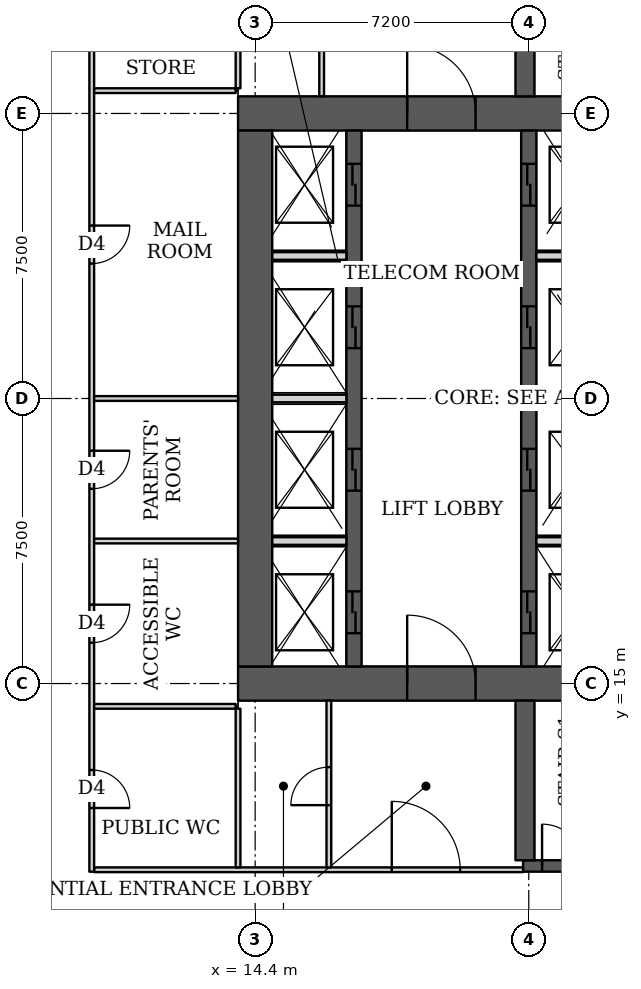
"""IFC4 building model, lengths in metres.
Left out: names, types, materials, properties, quantities, classifications, styles, units other than length and angle.
Written with IfcOpenShell. Run it as: python <this file> out.ifc"""

import sys

from ifc_helpers import new_model, si_unit, direction, frame, frame_2d, origin, place, context, subcontext, project, spatial, rectangle, extrude, element, fill, save


model = new_model("IFC4")
c1 = context("Model", 3, precision=1e-05, world=origin(), true_north=direction((0.0, 1.0)))
c2 = subcontext(c1, "Body", "Model", "MODEL_VIEW")
j1 = project(units=[si_unit("LENGTHUNIT", "METRE"), si_unit("PLANEANGLEUNIT", "RADIAN")], contexts=[c1])
p1 = place(None, origin())
s1 = spatial("IfcSite", under=j1, at=p1, CompositionType="ELEMENT")
p2 = place(p1, origin())
s2 = spatial("IfcBuilding", under=s1, at=p2, CompositionType="ELEMENT")
p3 = place(p2, origin())
s3 = spatial("IfcBuildingStorey", under=s2, at=p3, CompositionType="ELEMENT", Elevation=0.0)
p4 = place(p3, frame((13.95, 15.0, 0.0), z_axis=(0.0, 0.0, 1.0), x_axis=(1.0, 0.0, 0.0)))
e1 = element("IfcWall", 1, at=p4, inside=s3, PredefinedType="SHEAR", context=c2, shape_type="SweptSolid", body=[
    extrude(rectangle(XDim=15.3, YDim=0.9, at=frame_2d((7.65, 0.0))), origin(), (0.0, 0.0, 1.0), 5.6),
])
p5 = place(p4, frame((4.45, 0.0, 0.0)))
e2 = element("IfcOpeningElement", 2, at=p5, cuts=e1, PredefinedType="OPENING", context=c2, shape_type="SweptSolid", body=[
    extrude(rectangle(XDim=1.8, YDim=2.1, at=frame_2d((0.9, 1.05))), frame((0.0, 0.46, 0.0), z_axis=(0.0, -1.0, 0.0), x_axis=(1.0, 0.0, 0.0)), (0.0, 0.0, 1.0), 0.92),
])
p6 = place(p4, frame((10.7, 0.0, 0.0)))
e3 = element("IfcOpeningElement", 3, at=p6, cuts=e1, PredefinedType="OPENING", context=c2, shape_type="SweptSolid", body=[
    extrude(rectangle(XDim=1.1, YDim=2.1, at=frame_2d((0.55, 1.05))), frame((0.0, 0.46, 0.0), z_axis=(0.0, -1.0, 0.0), x_axis=(1.0, 0.0, 0.0)), (0.0, 0.0, 1.0), 0.92),
])
p7 = place(p3, frame((13.95, 30.0, 0.0), z_axis=(0.0, 0.0, 1.0), x_axis=(1.0, 0.0, 0.0)))
e4 = element("IfcWall", 4, at=p7, inside=s3, PredefinedType="SHEAR", context=c2, shape_type="SweptSolid", body=[
    extrude(rectangle(XDim=15.3, YDim=0.9, at=frame_2d((7.65, 0.0))), origin(), (0.0, 0.0, 1.0), 5.6),
])
p8 = place(p7, frame((4.45, 0.0, 0.0)))
e5 = element("IfcOpeningElement", 5, at=p8, cuts=e4, PredefinedType="OPENING", context=c2, shape_type="SweptSolid", body=[
    extrude(rectangle(XDim=1.8, YDim=2.1, at=frame_2d((0.9, 1.05))), frame((0.0, 0.46, 0.0), z_axis=(0.0, -1.0, 0.0), x_axis=(1.0, 0.0, 0.0)), (0.0, 0.0, 1.0), 0.92),
])
p9 = place(p7, frame((10.7, 0.0, 0.0)))
e6 = element("IfcOpeningElement", 6, at=p9, cuts=e4, PredefinedType="OPENING", context=c2, shape_type="SweptSolid", body=[
    extrude(rectangle(XDim=1.1, YDim=2.1, at=frame_2d((0.55, 1.05))), frame((0.0, 0.46, 0.0), z_axis=(0.0, -1.0, 0.0), x_axis=(1.0, 0.0, 0.0)), (0.0, 0.0, 1.0), 0.92),
])
p10 = place(p3, frame((14.4, 15.45, 0.0), z_axis=(0.0, 0.0, 1.0), x_axis=(0.0, 1.0, 0.0)))
e7 = element("IfcWall", 7, at=p10, inside=s3, PredefinedType="SHEAR", context=c2, shape_type="SweptSolid", body=[
    extrude(rectangle(XDim=14.1, YDim=0.9, at=frame_2d((7.05, 0.0))), origin(), (0.0, 0.0, 1.0), 5.6),
])
p11 = place(p3, frame((17.0, 15.45, 0.0), z_axis=(0.0, 0.0, 1.0), x_axis=(0.0, 1.0, 0.0)))
e8 = element("IfcWall", 8, at=p11, inside=s3, PredefinedType="SHEAR", context=c2, shape_type="SweptSolid", body=[
    extrude(rectangle(XDim=14.1, YDim=0.4, at=frame_2d((7.05, 0.0))), origin(), (0.0, 0.0, 1.0), 5.6),
])
p12 = place(p11, frame((0.875, 0.0, 0.0)))
e9 = element("IfcOpeningElement", 9, at=p12, cuts=e8, PredefinedType="OPENING", context=c2, shape_type="SweptSolid", body=[
    extrude(rectangle(XDim=1.1, YDim=2.1, at=frame_2d((0.55, 1.05))), frame((0.0, 0.21, 0.0), z_axis=(0.0, -1.0, 0.0), x_axis=(1.0, 0.0, 0.0)), (0.0, 0.0, 1.0), 0.42),
])
p13 = place(p11, frame((4.625, 0.0, 0.0)))
e10 = element("IfcOpeningElement", 10, at=p13, cuts=e8, PredefinedType="OPENING", context=c2, shape_type="SweptSolid", body=[
    extrude(rectangle(XDim=1.1, YDim=2.1, at=frame_2d((0.55, 1.05))), frame((0.0, 0.21, 0.0), z_axis=(0.0, -1.0, 0.0), x_axis=(1.0, 0.0, 0.0)), (0.0, 0.0, 1.0), 0.42),
])
p14 = place(p11, frame((8.375, 0.0, 0.0)))
e11 = element("IfcOpeningElement", 11, at=p14, cuts=e8, PredefinedType="OPENING", context=c2, shape_type="SweptSolid", body=[
    extrude(rectangle(XDim=1.1, YDim=2.1, at=frame_2d((0.55, 1.05))), frame((0.0, 0.21, 0.0), z_axis=(0.0, -1.0, 0.0), x_axis=(1.0, 0.0, 0.0)), (0.0, 0.0, 1.0), 0.42),
])
p15 = place(p11, frame((12.125, 0.0, 0.0)))
e12 = element("IfcOpeningElement", 12, at=p15, cuts=e8, PredefinedType="OPENING", context=c2, shape_type="SweptSolid", body=[
    extrude(rectangle(XDim=1.1, YDim=2.1, at=frame_2d((0.55, 1.05))), frame((0.0, 0.21, 0.0), z_axis=(0.0, -1.0, 0.0), x_axis=(1.0, 0.0, 0.0)), (0.0, 0.0, 1.0), 0.42),
])
p16 = place(p3, frame((21.6, 15.45, 0.0), z_axis=(0.0, 0.0, 1.0), x_axis=(0.0, 1.0, 0.0)))
e13 = element("IfcWall", 13, at=p16, inside=s3, PredefinedType="SHEAR", context=c2, shape_type="SweptSolid", body=[
    extrude(rectangle(XDim=14.1, YDim=0.4, at=frame_2d((7.05, 0.0))), origin(), (0.0, 0.0, 1.0), 5.6),
])
p17 = place(p16, frame((0.875, 0.0, 0.0)))
e14 = element("IfcOpeningElement", 14, at=p17, cuts=e13, PredefinedType="OPENING", context=c2, shape_type="SweptSolid", body=[
    extrude(rectangle(XDim=1.1, YDim=2.1, at=frame_2d((0.55, 1.05))), frame((0.0, 0.21, 0.0), z_axis=(0.0, -1.0, 0.0), x_axis=(1.0, 0.0, 0.0)), (0.0, 0.0, 1.0), 0.42),
])
p18 = place(p16, frame((4.625, 0.0, 0.0)))
e15 = element("IfcOpeningElement", 15, at=p18, cuts=e13, PredefinedType="OPENING", context=c2, shape_type="SweptSolid", body=[
    extrude(rectangle(XDim=1.1, YDim=2.1, at=frame_2d((0.55, 1.05))), frame((0.0, 0.21, 0.0), z_axis=(0.0, -1.0, 0.0), x_axis=(1.0, 0.0, 0.0)), (0.0, 0.0, 1.0), 0.42),
])
p19 = place(p16, frame((8.375, 0.0, 0.0)))
e16 = element("IfcOpeningElement", 16, at=p19, cuts=e13, PredefinedType="OPENING", context=c2, shape_type="SweptSolid", body=[
    extrude(rectangle(XDim=1.1, YDim=2.1, at=frame_2d((0.55, 1.05))), frame((0.0, 0.21, 0.0), z_axis=(0.0, -1.0, 0.0), x_axis=(1.0, 0.0, 0.0)), (0.0, 0.0, 1.0), 0.42),
])
p20 = place(p16, frame((12.125, 0.0, 0.0)))
e17 = element("IfcOpeningElement", 17, at=p20, cuts=e13, PredefinedType="OPENING", context=c2, shape_type="SweptSolid", body=[
    extrude(rectangle(XDim=1.1, YDim=2.1, at=frame_2d((0.55, 1.05))), frame((0.0, 0.21, 0.0), z_axis=(0.0, -1.0, 0.0), x_axis=(1.0, 0.0, 0.0)), (0.0, 0.0, 1.0), 0.42),
])
p21 = place(p3, frame((21.45, 10.2, 0.0), z_axis=(0.0, 0.0, 1.0), x_axis=(1.0, 0.0, 0.0)))
e18 = element("IfcWall", 18, at=p21, inside=s3, PredefinedType="SHEAR", context=c2, shape_type="SweptSolid", body=[
    extrude(rectangle(XDim=7.5, YDim=0.3, at=frame_2d((3.75, 0.0))), origin(), (0.0, 0.0, 1.0), 5.6),
])
p22 = place(p21, frame((0.5, 0.0, 0.0)))
e19 = element("IfcOpeningElement", 19, at=p22, cuts=e18, PredefinedType="OPENING", context=c2, shape_type="SweptSolid", body=[
    extrude(rectangle(XDim=1.1, YDim=2.1, at=frame_2d((0.55, 1.05))), frame((0.0, 0.16, 0.0), z_axis=(0.0, -1.0, 0.0), x_axis=(1.0, 0.0, 0.0)), (0.0, 0.0, 1.0), 0.32),
])
for number, where, z_axis, x_axis in (
    (20, (21.5, 10.35, 0.0), (0.0, 0.0, 1.0), (0.0, 1.0, 0.0)),
    (21, (21.5, 30.45, 0.0), (0.0, 0.0, 1.0), (0.0, 1.0, 0.0)),
):
    element("IfcWall", number, at=place(p3, frame(where, z_axis=z_axis, x_axis=x_axis)), inside=s3, PredefinedType="SHEAR", context=c2, shape_type="SweptSolid", body=[
        extrude(rectangle(XDim=4.2, YDim=0.5, at=frame_2d((2.1, 0.0))), origin(), (0.0, 0.0, 1.0), 5.6),
    ])
p23 = place(p3, frame((10.1, 10.05, 0.0), z_axis=(0.0, 0.0, 1.0), x_axis=(0.0, 1.0, 0.0)))
e22 = element("IfcWall", 22, at=p23, inside=s3, PredefinedType="PARTITIONING", context=c2, shape_type="SweptSolid", body=[
    extrude(rectangle(XDim=24.9, YDim=0.125, at=frame_2d((12.45, 0.0))), origin(), (0.0, 0.0, 1.0), 3.7),
])
p24 = place(p23, frame((1.675, 0.0, 0.0)))
e23 = element("IfcOpeningElement", 23, at=p24, cuts=e22, PredefinedType="OPENING", context=c2, shape_type="SweptSolid", body=[
    extrude(rectangle(XDim=1.0, YDim=2.1, at=frame_2d((0.5, 1.05))), frame((0.0, 0.073, 0.0), z_axis=(0.0, -1.0, 0.0), x_axis=(1.0, 0.0, 0.0)), (0.0, 0.0, 1.0), 0.145),
])
p25 = place(p23, frame((16.0, 0.0, 0.0)))
e24 = element("IfcOpeningElement", 24, at=p25, cuts=e22, PredefinedType="OPENING", context=c2, shape_type="SweptSolid", body=[
    extrude(rectangle(XDim=1.0, YDim=2.1, at=frame_2d((0.5, 1.05))), frame((0.0, 0.073, 0.0), z_axis=(0.0, -1.0, 0.0), x_axis=(1.0, 0.0, 0.0)), (0.0, 0.0, 1.0), 0.145),
])
p26 = place(p23, frame((22.225, 0.0, 0.0)))
e25 = element("IfcOpeningElement", 25, at=p26, cuts=e22, PredefinedType="OPENING", context=c2, shape_type="SweptSolid", body=[
    extrude(rectangle(XDim=1.0, YDim=2.1, at=frame_2d((0.5, 1.05))), frame((0.0, 0.073, 0.0), z_axis=(0.0, -1.0, 0.0), x_axis=(1.0, 0.0, 0.0)), (0.0, 0.0, 1.0), 0.145),
])
p27 = place(p23, frame((6.025, 0.0, 0.0)))
e26 = element("IfcOpeningElement", 26, at=p27, cuts=e22, PredefinedType="OPENING", context=c2, shape_type="SweptSolid", body=[
    extrude(rectangle(XDim=1.0, YDim=2.1, at=frame_2d((0.5, 1.05))), frame((0.0, 0.073, 0.0), z_axis=(0.0, -1.0, 0.0), x_axis=(1.0, 0.0, 0.0)), (0.0, 0.0, 1.0), 0.145),
])
p28 = place(p23, frame((10.075, 0.0, 0.0)))
e27 = element("IfcOpeningElement", 27, at=p28, cuts=e22, PredefinedType="OPENING", context=c2, shape_type="SweptSolid", body=[
    extrude(rectangle(XDim=1.0, YDim=2.1, at=frame_2d((0.5, 1.05))), frame((0.0, 0.073, 0.0), z_axis=(0.0, -1.0, 0.0), x_axis=(1.0, 0.0, 0.0)), (0.0, 0.0, 1.0), 0.145),
])
p29 = place(p3, frame((10.163, 14.4, 0.0), z_axis=(0.0, 0.0, 1.0), x_axis=(1.0, 0.0, 0.0)))
e28 = element("IfcWall", 28, at=p29, inside=s3, PredefinedType="PARTITIONING", context=c2, shape_type="SweptSolid", body=[
    extrude(rectangle(XDim=3.725, YDim=0.125, at=frame_2d((1.862, 0.0))), origin(), (0.0, 0.0, 1.0), 3.7),
])
p30 = place(p3, frame((10.163, 22.5, 0.0), z_axis=(0.0, 0.0, 1.0), x_axis=(1.0, 0.0, 0.0)))
e29 = element("IfcWall", 29, at=p30, inside=s3, PredefinedType="PARTITIONING", context=c2, shape_type="SweptSolid", body=[
    extrude(rectangle(XDim=3.787, YDim=0.125, at=frame_2d((1.894, 0.0))), origin(), (0.0, 0.0, 1.0), 3.7),
])
p31 = place(p3, frame((10.163, 30.6, 0.0), z_axis=(0.0, 0.0, 1.0), x_axis=(1.0, 0.0, 0.0)))
e30 = element("IfcWall", 30, at=p31, inside=s3, PredefinedType="PARTITIONING", context=c2, shape_type="SweptSolid", body=[
    extrude(rectangle(XDim=3.725, YDim=0.125, at=frame_2d((1.862, 0.0))), origin(), (0.0, 0.0, 1.0), 3.7),
])
p32 = place(p3, frame((13.95, 10.163, 0.0), z_axis=(0.0, 0.0, 1.0), x_axis=(0.0, 1.0, 0.0)))
e31 = element("IfcWall", 31, at=p32, inside=s3, PredefinedType="PARTITIONING", context=c2, shape_type="SweptSolid", body=[
    extrude(rectangle(XDim=4.175, YDim=0.125, at=frame_2d((2.087, 0.0))), origin(), (0.0, 0.0, 1.0), 3.7),
])
p33 = place(p3, frame((13.95, 30.663, 0.0), z_axis=(0.0, 0.0, 1.0), x_axis=(0.0, 1.0, 0.0)))
e32 = element("IfcWall", 32, at=p33, inside=s3, PredefinedType="PARTITIONING", context=c2, shape_type="SweptSolid", body=[
    extrude(rectangle(XDim=4.174, YDim=0.125, at=frame_2d((2.087, 0.0))), origin(), (0.0, 0.0, 1.0), 3.7),
])
p34 = place(p3, frame((10.163, 10.1, 0.0), z_axis=(0.0, 0.0, 1.0), x_axis=(1.0, 0.0, 0.0)))
e33 = element("IfcWall", 33, at=p34, inside=s3, PredefinedType="PARTITIONING", context=c2, shape_type="SweptSolid", body=[
    extrude(rectangle(XDim=11.287, YDim=0.125, at=frame_2d((5.644, 0.0))), origin(), (0.0, 0.0, 1.0), 3.3),
])
p35 = place(p34, frame((7.832, 0.0, 0.0)))
e34 = element("IfcOpeningElement", 34, at=p35, cuts=e33, PredefinedType="OPENING", context=c2, shape_type="SweptSolid", body=[
    extrude(rectangle(XDim=1.8, YDim=2.1, at=frame_2d((0.9, 1.05))), frame((0.0, 0.073, 0.0), z_axis=(0.0, -1.0, 0.0), x_axis=(1.0, 0.0, 0.0)), (0.0, 0.0, 1.0), 0.145),
])
p36 = place(p3, frame((16.34, 10.163, 0.0), z_axis=(0.0, 0.0, 1.0), x_axis=(0.0, 1.0, 0.0)))
e35 = element("IfcWall", 35, at=p36, inside=s3, PredefinedType="PARTITIONING", context=c2, shape_type="SweptSolid", body=[
    extrude(rectangle(XDim=4.387, YDim=0.125, at=frame_2d((2.193, 0.0))), origin(), (0.0, 0.0, 1.0), 5.3),
])
p37 = place(p36, frame((1.637, 0.0, 0.0)))
e36 = element("IfcOpeningElement", 36, at=p37, cuts=e35, PredefinedType="OPENING", context=c2, shape_type="SweptSolid", body=[
    extrude(rectangle(XDim=1.0, YDim=2.1, at=frame_2d((0.5, 1.05))), frame((0.0, 0.073, 0.0), z_axis=(0.0, -1.0, 0.0), x_axis=(1.0, 0.0, 0.0)), (0.0, 0.0, 1.0), 0.145),
])
p38 = place(p3, frame((16.15, 30.45, 0.0), z_axis=(0.0, 0.0, 1.0), x_axis=(0.0, 1.0, 0.0)))
e37 = element("IfcWall", 37, at=p38, inside=s3, PredefinedType="PARTITIONING", context=c2, shape_type="SweptSolid", body=[
    extrude(rectangle(XDim=4.387, YDim=0.125, at=frame_2d((2.193, 0.0))), origin(), (0.0, 0.0, 1.0), 5.3),
])
p39 = place(p38, frame((1.75, 0.0, 0.0)))
e38 = element("IfcOpeningElement", 38, at=p39, cuts=e37, PredefinedType="OPENING", context=c2, shape_type="SweptSolid", body=[
    extrude(rectangle(XDim=1.0, YDim=2.1, at=frame_2d((0.5, 1.05))), frame((0.0, 0.073, 0.0), z_axis=(0.0, -1.0, 0.0), x_axis=(1.0, 0.0, 0.0)), (0.0, 0.0, 1.0), 0.145),
])
p40 = place(p3, frame((10.163, 18.75, 0.0), z_axis=(0.0, 0.0, 1.0), x_axis=(1.0, 0.0, 0.0)))
e39 = element("IfcWall", 39, at=p40, inside=s3, PredefinedType="PARTITIONING", context=c2, shape_type="SweptSolid", body=[
    extrude(rectangle(XDim=3.787, YDim=0.125, at=frame_2d((1.894, 0.0))), origin(), (0.0, 0.0, 1.0), 5.3),
])
p41 = place(p3, frame((14.85, 18.75, 0.0), z_axis=(0.0, 0.0, 1.0), x_axis=(1.0, 0.0, 0.0)))
e40 = element("IfcWall", 40, at=p41, inside=s3, PredefinedType="SOLIDWALL", context=c2, shape_type="SweptSolid", body=[
    extrude(rectangle(XDim=1.95, YDim=0.2, at=frame_2d((0.975, 0.0))), origin(), (0.0, 0.0, 1.0), 5.3),
])
p42 = place(p3, frame((21.8, 18.75, 0.0), z_axis=(0.0, 0.0, 1.0), x_axis=(1.0, 0.0, 0.0)))
e41 = element("IfcWall", 41, at=p42, inside=s3, PredefinedType="SOLIDWALL", context=c2, shape_type="SweptSolid", body=[
    extrude(rectangle(XDim=2.2, YDim=0.2, at=frame_2d((1.1, 0.0))), origin(), (0.0, 0.0, 1.0), 5.3),
])
p43 = place(p3, frame((14.85, 22.5, 0.0), z_axis=(0.0, 0.0, 1.0), x_axis=(1.0, 0.0, 0.0)))
e42 = element("IfcWall", 42, at=p43, inside=s3, PredefinedType="SOLIDWALL", context=c2, shape_type="SweptSolid", body=[
    extrude(rectangle(XDim=1.95, YDim=0.2, at=frame_2d((0.975, 0.0))), origin(), (0.0, 0.0, 1.0), 5.3),
])
p44 = place(p3, frame((21.8, 22.5, 0.0), z_axis=(0.0, 0.0, 1.0), x_axis=(1.0, 0.0, 0.0)))
e43 = element("IfcWall", 43, at=p44, inside=s3, PredefinedType="SOLIDWALL", context=c2, shape_type="SweptSolid", body=[
    extrude(rectangle(XDim=2.2, YDim=0.2, at=frame_2d((1.1, 0.0))), origin(), (0.0, 0.0, 1.0), 5.3),
])
p45 = place(p3, frame((14.85, 26.25, 0.0), z_axis=(0.0, 0.0, 1.0), x_axis=(1.0, 0.0, 0.0)))
e44 = element("IfcWall", 44, at=p45, inside=s3, PredefinedType="SOLIDWALL", context=c2, shape_type="SweptSolid", body=[
    extrude(rectangle(XDim=1.95, YDim=0.2, at=frame_2d((0.975, 0.0))), origin(), (0.0, 0.0, 1.0), 5.3),
])
p46 = place(p3, frame((21.8, 26.25, 0.0), z_axis=(0.0, 0.0, 1.0), x_axis=(1.0, 0.0, 0.0)))
e45 = element("IfcWall", 45, at=p46, inside=s3, PredefinedType="SOLIDWALL", context=c2, shape_type="SweptSolid", body=[
    extrude(rectangle(XDim=2.2, YDim=0.2, at=frame_2d((1.1, 0.0))), origin(), (0.0, 0.0, 1.0), 5.3),
])
p47 = place(p24, origin())
e46 = element("IfcDoor", 46, at=p47, inside=s3, OperationType="SINGLE_SWING_RIGHT", PredefinedType="DOOR", context=c2, shape_type="SweptSolid", body=[
    extrude(rectangle(XDim=1.0, YDim=2.1, at=frame_2d((0.5, 1.05))), frame((0.0, 0.025, 0.0), z_axis=(0.0, -1.0, 0.0), x_axis=(1.0, 0.0, 0.0)), (0.0, 0.0, 1.0), 0.05),
])
fill(e23, e46)
p48 = place(p25, origin())
e47 = element("IfcDoor", 47, at=p48, inside=s3, OperationType="SINGLE_SWING_LEFT", PredefinedType="DOOR", context=c2, shape_type="SweptSolid", body=[
    extrude(rectangle(XDim=1.0, YDim=2.1, at=frame_2d((0.5, 1.05))), frame((0.0, 0.025, 0.0), z_axis=(0.0, -1.0, 0.0), x_axis=(1.0, 0.0, 0.0)), (0.0, 0.0, 1.0), 0.05),
])
fill(e24, e47)
p49 = place(p37, origin())
e48 = element("IfcDoor", 48, at=p49, inside=s3, OperationType="SINGLE_SWING_LEFT", PredefinedType="DOOR", context=c2, shape_type="SweptSolid", body=[
    extrude(rectangle(XDim=1.0, YDim=2.1, at=frame_2d((0.5, 1.05))), frame((0.0, 0.025, 0.0), z_axis=(0.0, -1.0, 0.0), x_axis=(1.0, 0.0, 0.0)), (0.0, 0.0, 1.0), 0.05),
])
fill(e36, e48)
p50 = place(p35, origin())
e49 = element("IfcDoor", 49, at=p50, inside=s3, OperationType="DOUBLE_DOOR_SINGLE_SWING", PredefinedType="DOOR", context=c2, shape_type="SweptSolid", body=[
    extrude(rectangle(XDim=1.8, YDim=2.1, at=frame_2d((0.9, 1.05))), frame((0.0, 0.025, 0.0), z_axis=(0.0, -1.0, 0.0), x_axis=(1.0, 0.0, 0.0)), (0.0, 0.0, 1.0), 0.05),
])
fill(e34, e49)
p51 = place(p27, origin())
e50 = element("IfcDoor", 50, at=p51, inside=s3, OperationType="SINGLE_SWING_LEFT", PredefinedType="DOOR", context=c2, shape_type="SweptSolid", body=[
    extrude(rectangle(XDim=1.0, YDim=2.1, at=frame_2d((0.5, 1.05))), frame((0.0, 0.025, 0.0), z_axis=(0.0, -1.0, 0.0), x_axis=(1.0, 0.0, 0.0)), (0.0, 0.0, 1.0), 0.05),
])
fill(e26, e50)
p52 = place(p28, origin())
e51 = element("IfcDoor", 51, at=p52, inside=s3, OperationType="SINGLE_SWING_LEFT", PredefinedType="DOOR", context=c2, shape_type="SweptSolid", body=[
    extrude(rectangle(XDim=1.0, YDim=2.1, at=frame_2d((0.5, 1.05))), frame((0.0, 0.025, 0.0), z_axis=(0.0, -1.0, 0.0), x_axis=(1.0, 0.0, 0.0)), (0.0, 0.0, 1.0), 0.05),
])
fill(e27, e51)
p53 = place(p5, origin())
e52 = element("IfcDoor", 52, at=p53, inside=s3, OperationType="DOUBLE_DOOR_SINGLE_SWING", PredefinedType="DOOR", context=c2, shape_type="SweptSolid", body=[
    extrude(rectangle(XDim=1.8, YDim=2.1, at=frame_2d((0.9, 1.05))), frame((0.0, 0.025, 0.0), z_axis=(0.0, -1.0, 0.0), x_axis=(1.0, 0.0, 0.0)), (0.0, 0.0, 1.0), 0.05),
])
fill(e2, e52)
p54 = place(p8, origin())
e53 = element("IfcDoor", 53, at=p54, inside=s3, OperationType="DOUBLE_DOOR_SINGLE_SWING", PredefinedType="DOOR", context=c2, shape_type="SweptSolid", body=[
    extrude(rectangle(XDim=1.8, YDim=2.1, at=frame_2d((0.9, 1.05))), frame((0.0, 0.025, 0.0), z_axis=(0.0, -1.0, 0.0), x_axis=(1.0, 0.0, 0.0)), (0.0, 0.0, 1.0), 0.05),
])
fill(e5, e53)
p55 = place(p12, origin())
e54 = element("IfcDoor", 54, at=p55, inside=s3, OperationType="DOUBLE_DOOR_SLIDING", PredefinedType="DOOR", context=c2, shape_type="SweptSolid", body=[
    extrude(rectangle(XDim=1.1, YDim=2.1, at=frame_2d((0.55, 1.05))), frame((0.0, 0.025, 0.0), z_axis=(0.0, -1.0, 0.0), x_axis=(1.0, 0.0, 0.0)), (0.0, 0.0, 1.0), 0.05),
])
fill(e9, e54)
p56 = place(p13, origin())
e55 = element("IfcDoor", 55, at=p56, inside=s3, OperationType="DOUBLE_DOOR_SLIDING", PredefinedType="DOOR", context=c2, shape_type="SweptSolid", body=[
    extrude(rectangle(XDim=1.1, YDim=2.1, at=frame_2d((0.55, 1.05))), frame((0.0, 0.025, 0.0), z_axis=(0.0, -1.0, 0.0), x_axis=(1.0, 0.0, 0.0)), (0.0, 0.0, 1.0), 0.05),
])
fill(e10, e55)
p57 = place(p14, origin())
e56 = element("IfcDoor", 56, at=p57, inside=s3, OperationType="DOUBLE_DOOR_SLIDING", PredefinedType="DOOR", context=c2, shape_type="SweptSolid", body=[
    extrude(rectangle(XDim=1.1, YDim=2.1, at=frame_2d((0.55, 1.05))), frame((0.0, 0.025, 0.0), z_axis=(0.0, -1.0, 0.0), x_axis=(1.0, 0.0, 0.0)), (0.0, 0.0, 1.0), 0.05),
])
fill(e11, e56)
p58 = place(p15, origin())
e57 = element("IfcDoor", 57, at=p58, inside=s3, OperationType="DOUBLE_DOOR_SLIDING", PredefinedType="DOOR", context=c2, shape_type="SweptSolid", body=[
    extrude(rectangle(XDim=1.1, YDim=2.1, at=frame_2d((0.55, 1.05))), frame((0.0, 0.025, 0.0), z_axis=(0.0, -1.0, 0.0), x_axis=(1.0, 0.0, 0.0)), (0.0, 0.0, 1.0), 0.05),
])
fill(e12, e57)
p59 = place(p17, origin())
e58 = element("IfcDoor", 58, at=p59, inside=s3, OperationType="DOUBLE_DOOR_SLIDING", PredefinedType="DOOR", context=c2, shape_type="SweptSolid", body=[
    extrude(rectangle(XDim=1.1, YDim=2.1, at=frame_2d((0.55, 1.05))), frame((0.0, 0.025, 0.0), z_axis=(0.0, -1.0, 0.0), x_axis=(1.0, 0.0, 0.0)), (0.0, 0.0, 1.0), 0.05),
])
fill(e14, e58)
p60 = place(p18, origin())
e59 = element("IfcDoor", 59, at=p60, inside=s3, OperationType="DOUBLE_DOOR_SLIDING", PredefinedType="DOOR", context=c2, shape_type="SweptSolid", body=[
    extrude(rectangle(XDim=1.1, YDim=2.1, at=frame_2d((0.55, 1.05))), frame((0.0, 0.025, 0.0), z_axis=(0.0, -1.0, 0.0), x_axis=(1.0, 0.0, 0.0)), (0.0, 0.0, 1.0), 0.05),
])
fill(e15, e59)
p61 = place(p19, origin())
e60 = element("IfcDoor", 60, at=p61, inside=s3, OperationType="DOUBLE_DOOR_SLIDING", PredefinedType="DOOR", context=c2, shape_type="SweptSolid", body=[
    extrude(rectangle(XDim=1.1, YDim=2.1, at=frame_2d((0.55, 1.05))), frame((0.0, 0.025, 0.0), z_axis=(0.0, -1.0, 0.0), x_axis=(1.0, 0.0, 0.0)), (0.0, 0.0, 1.0), 0.05),
])
fill(e16, e60)
p62 = place(p20, origin())
e61 = element("IfcDoor", 61, at=p62, inside=s3, OperationType="DOUBLE_DOOR_SLIDING", PredefinedType="DOOR", context=c2, shape_type="SweptSolid", body=[
    extrude(rectangle(XDim=1.1, YDim=2.1, at=frame_2d((0.55, 1.05))), frame((0.0, 0.025, 0.0), z_axis=(0.0, -1.0, 0.0), x_axis=(1.0, 0.0, 0.0)), (0.0, 0.0, 1.0), 0.05),
])
fill(e17, e61)
p63 = place(p22, origin())
e62 = element("IfcDoor", 62, at=p63, inside=s3, OperationType="SINGLE_SWING_LEFT", PredefinedType="DOOR", context=c2, shape_type="SweptSolid", body=[
    extrude(rectangle(XDim=1.1, YDim=2.1, at=frame_2d((0.55, 1.05))), frame((0.0, 0.025, 0.0), z_axis=(0.0, -1.0, 0.0), x_axis=(1.0, 0.0, 0.0)), (0.0, 0.0, 1.0), 0.05),
])
fill(e19, e62)
save(model, sys.argv[1])
